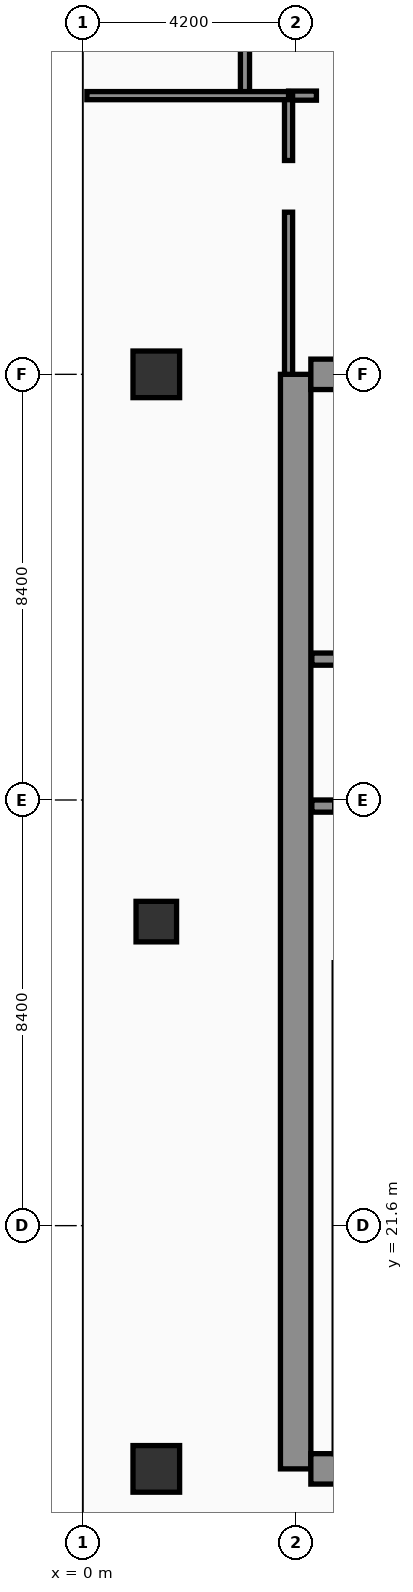
"""IFC4 building model, lengths in metres.
Left out: names, types, materials, properties, quantities, classifications, styles, units other than length and angle.
Written with IfcOpenShell. Run it as: python <this file> out.ifc"""

import sys

from ifc_helpers import new_model, si_unit, direction, frame, frame_2d, origin, origin_2d, place, context, subcontext, project, spatial, rectangle, extrude, element, fill, save


model = new_model("IFC4")
c1 = context("Model", 3, precision=1e-05, world=origin(), true_north=direction((0.0, 1.0)))
c2 = subcontext(c1, "Body", "Model", "MODEL_VIEW")
j1 = project(units=[si_unit("LENGTHUNIT", "METRE"), si_unit("PLANEANGLEUNIT", "RADIAN")], contexts=[c1])
p1 = place(None, origin())
s1 = spatial("IfcSite", under=j1, at=p1, CompositionType="ELEMENT")
p2 = place(p1, origin())
s2 = spatial("IfcBuilding", under=s1, at=p2, CompositionType="ELEMENT")
p3 = place(p2, frame((0.0, 0.0, 307.0)))
s3 = spatial("IfcBuildingStorey", under=s2, at=p3, CompositionType="ELEMENT", Elevation=307.0)
p4 = place(p3, frame((4.2, 16.8, 0.0), z_axis=(0.0, 0.0, 1.0), x_axis=(0.0, 1.0, 0.0)))
e1 = element("IfcWall", 1, at=p4, inside=s3, PredefinedType="SHEAR", context=c2, shape_type="SweptSolid", body=[
    extrude(rectangle(XDim=21.6, YDim=0.6, at=frame_2d((10.8, 0.0))), origin(), (0.0, 0.0, 1.0), 4.26),
])
p5 = place(p3, frame((4.5, 38.4, 0.0), z_axis=(0.0, 0.0, 1.0), x_axis=(1.0, 0.0, 0.0)))
e2 = element("IfcWall", 2, at=p5, inside=s3, PredefinedType="SHEAR", context=c2, shape_type="SweptSolid", body=[
    extrude(rectangle(XDim=10.2, YDim=0.6, at=frame_2d((5.1, 0.0))), origin(), (0.0, 0.0, 1.0), 4.26),
])
p6 = place(p5, frame((5.8, 0.0, 0.0)))
e3 = element("IfcOpeningElement", 3, at=p6, cuts=e2, PredefinedType="OPENING", context=c2, shape_type="SweptSolid", body=[
    extrude(rectangle(XDim=1.1, YDim=2.2, at=frame_2d((0.55, 1.1))), frame((0.0, 0.31, 0.0), z_axis=(0.0, -1.0, 0.0), x_axis=(1.0, 0.0, 0.0)), (0.0, 0.0, 1.0), 0.62),
])
p7 = place(p3, frame((4.5, 16.8, 0.0), z_axis=(0.0, 0.0, 1.0), x_axis=(1.0, 0.0, 0.0)))
e4 = element("IfcWall", 4, at=p7, inside=s3, PredefinedType="SHEAR", context=c2, shape_type="SweptSolid", body=[
    extrude(rectangle(XDim=10.2, YDim=0.6, at=frame_2d((5.1, 0.0))), origin(), (0.0, 0.0, 1.0), 4.26),
])
p8 = place(p3, frame((1.45, 16.8, 0.0), z_axis=(0.0, 0.0, 1.0), x_axis=(1.0, 0.0, 0.0)))
e5 = element("IfcColumn", 5, at=p8, inside=s3, PredefinedType="COLUMN", context=c2, shape_type="SweptSolid", body=[
    extrude(rectangle(XDim=0.92, YDim=0.92, at=origin_2d()), origin(), (0.0, 0.0, 1.0), 4.26),
])
p9 = place(p3, frame((1.45, 27.6, 0.0), z_axis=(0.0, 0.0, 1.0), x_axis=(1.0, 0.0, 0.0)))
e6 = element("IfcColumn", 6, at=p9, inside=s3, PredefinedType="COLUMN", context=c2, shape_type="SweptSolid", body=[
    extrude(rectangle(XDim=0.8, YDim=0.8, at=origin_2d()), origin(), (0.0, 0.0, 1.0), 4.26),
])
p10 = place(p3, frame((1.45, 38.4, 0.0), z_axis=(0.0, 0.0, 1.0), x_axis=(1.0, 0.0, 0.0)))
e7 = element("IfcColumn", 7, at=p10, inside=s3, PredefinedType="COLUMN", context=c2, shape_type="SweptSolid", body=[
    extrude(rectangle(XDim=0.92, YDim=0.92, at=origin_2d()), origin(), (0.0, 0.0, 1.0), 4.26),
])
p11 = place(p3, frame((4.52, 29.88, 0.0), z_axis=(0.0, 0.0, 1.0), x_axis=(1.0, 0.0, 0.0)))
e8 = element("IfcWall", 8, at=p11, inside=s3, PredefinedType="SOLIDWALL", context=c2, shape_type="SweptSolid", body=[
    extrude(rectangle(XDim=4.9, YDim=0.24, at=frame_2d((2.45, 0.0))), origin(), (0.0, 0.0, 1.0), 4.26),
])
p12 = place(p11, frame((0.45, 0.0, 0.0)))
e9 = element("IfcOpeningElement", 9, at=p12, cuts=e8, PredefinedType="OPENING", context=c2, shape_type="SweptSolid", body=[
    extrude(rectangle(XDim=1.3, YDim=2.35, at=frame_2d((0.65, 1.175))), frame((0.0, 0.13, 0.0), z_axis=(0.0, -1.0, 0.0), x_axis=(1.0, 0.0, 0.0)), (0.0, 0.0, 1.0), 0.26),
])
p13 = place(p3, frame((4.52, 32.78, 0.0), z_axis=(0.0, 0.0, 1.0), x_axis=(1.0, 0.0, 0.0)))
e10 = element("IfcWall", 10, at=p13, inside=s3, PredefinedType="SOLIDWALL", context=c2, shape_type="SweptSolid", body=[
    extrude(rectangle(XDim=4.9, YDim=0.24, at=frame_2d((2.45, 0.0))), origin(), (0.0, 0.0, 1.0), 3.89),
])
p14 = place(p3, frame((3.2, 43.9, 0.0), z_axis=(0.0, 0.0, 1.0), x_axis=(0.0, 1.0, 0.0)))
e11 = element("IfcWall", 11, at=p14, inside=s3, PredefinedType="PARTITIONING", context=c2, shape_type="SweptSolid", body=[
    extrude(rectangle(XDim=3.9, YDim=0.18, at=frame_2d((1.95, 0.0))), origin(), (0.0, 0.0, 1.0), 4.26),
])
p15 = place(p3, frame((4.06, 43.9, 0.0), z_axis=(0.0, 0.0, 1.0), x_axis=(1.0, 0.0, 0.0)))
e12 = element("IfcWall", 12, at=p15, inside=s3, PredefinedType="PARTITIONING", context=c2, shape_type="SweptSolid", body=[
    extrude(rectangle(XDim=10.74, YDim=0.18, at=frame_2d((5.37, 0.0))), origin(), (0.0, 0.0, 1.0), 3.69),
])
p16 = place(p15, frame((0.55, 0.0, 0.0)))
e13 = element("IfcOpeningElement", 13, at=p16, cuts=e12, PredefinedType="OPENING", context=c2, shape_type="SweptSolid", body=[
    extrude(rectangle(XDim=1.02, YDim=2.2, at=frame_2d((0.51, 1.1))), frame((0.0, 0.1, 0.0), z_axis=(0.0, -1.0, 0.0), x_axis=(1.0, 0.0, 0.0)), (0.0, 0.0, 1.0), 0.2),
])
p17 = place(p15, frame((4.65, 0.0, 0.0)))
e14 = element("IfcOpeningElement", 14, at=p17, cuts=e12, PredefinedType="OPENING", context=c2, shape_type="SweptSolid", body=[
    extrude(rectangle(XDim=1.02, YDim=2.2, at=frame_2d((0.51, 1.1))), frame((0.0, 0.1, 0.0), z_axis=(0.0, -1.0, 0.0), x_axis=(1.0, 0.0, 0.0)), (0.0, 0.0, 1.0), 0.2),
])
p18 = place(p15, frame((8.4, 0.0, 0.0)))
e15 = element("IfcOpeningElement", 15, at=p18, cuts=e12, PredefinedType="OPENING", context=c2, shape_type="SweptSolid", body=[
    extrude(rectangle(XDim=1.02, YDim=2.2, at=frame_2d((0.51, 1.1))), frame((0.0, 0.1, 0.0), z_axis=(0.0, -1.0, 0.0), x_axis=(1.0, 0.0, 0.0)), (0.0, 0.0, 1.0), 0.2),
])
p19 = place(p3, frame((4.06, 38.4, 0.0), z_axis=(0.0, 0.0, 1.0), x_axis=(0.0, 1.0, 0.0)))
e16 = element("IfcWall", 16, at=p19, inside=s3, PredefinedType="PARTITIONING", context=c2, shape_type="SweptSolid", body=[
    extrude(rectangle(XDim=5.5, YDim=0.16, at=frame_2d((2.75, 0.0))), origin(), (0.0, 0.0, 1.0), 3.69),
])
p20 = place(p19, frame((3.2, 0.0, 0.0)))
e17 = element("IfcOpeningElement", 17, at=p20, cuts=e16, PredefinedType="OPENING", context=c2, shape_type="SweptSolid", body=[
    extrude(rectangle(XDim=1.02, YDim=2.2, at=frame_2d((0.51, 1.1))), frame((0.0, 0.09, 0.0), z_axis=(0.0, -1.0, 0.0), x_axis=(1.0, 0.0, 0.0)), (0.0, 0.0, 1.0), 0.18),
])
p21 = place(p3, frame((0.08, 43.9, 0.0), z_axis=(0.0, 0.0, 1.0), x_axis=(1.0, 0.0, 0.0)))
e18 = element("IfcWall", 18, at=p21, inside=s3, PredefinedType="PARTITIONING", context=c2, shape_type="SweptSolid", body=[
    extrude(rectangle(XDim=3.98, YDim=0.16, at=frame_2d((1.99, 0.0))), origin(), (0.0, 0.0, 1.0), 3.69),
])
p22 = place(p16, origin())
e19 = element("IfcDoor", 19, at=p22, inside=s3, OperationType="SINGLE_SWING_LEFT", PredefinedType="DOOR", context=c2, shape_type="SweptSolid", body=[
    extrude(rectangle(XDim=1.02, YDim=2.2, at=frame_2d((0.51, 1.1))), frame((0.0, 0.025, 0.0), z_axis=(0.0, -1.0, 0.0), x_axis=(1.0, 0.0, 0.0)), (0.0, 0.0, 1.0), 0.05),
])
fill(e13, e19)
p23 = place(p20, origin())
e20 = element("IfcDoor", 20, at=p23, inside=s3, OperationType="SINGLE_SWING_LEFT", PredefinedType="DOOR", context=c2, shape_type="SweptSolid", body=[
    extrude(rectangle(XDim=1.02, YDim=2.2, at=frame_2d((0.51, 1.1))), frame((0.0, 0.025, 0.0), z_axis=(0.0, -1.0, 0.0), x_axis=(1.0, 0.0, 0.0)), (0.0, 0.0, 1.0), 0.05),
])
fill(e17, e20)
save(model, sys.argv[1])
